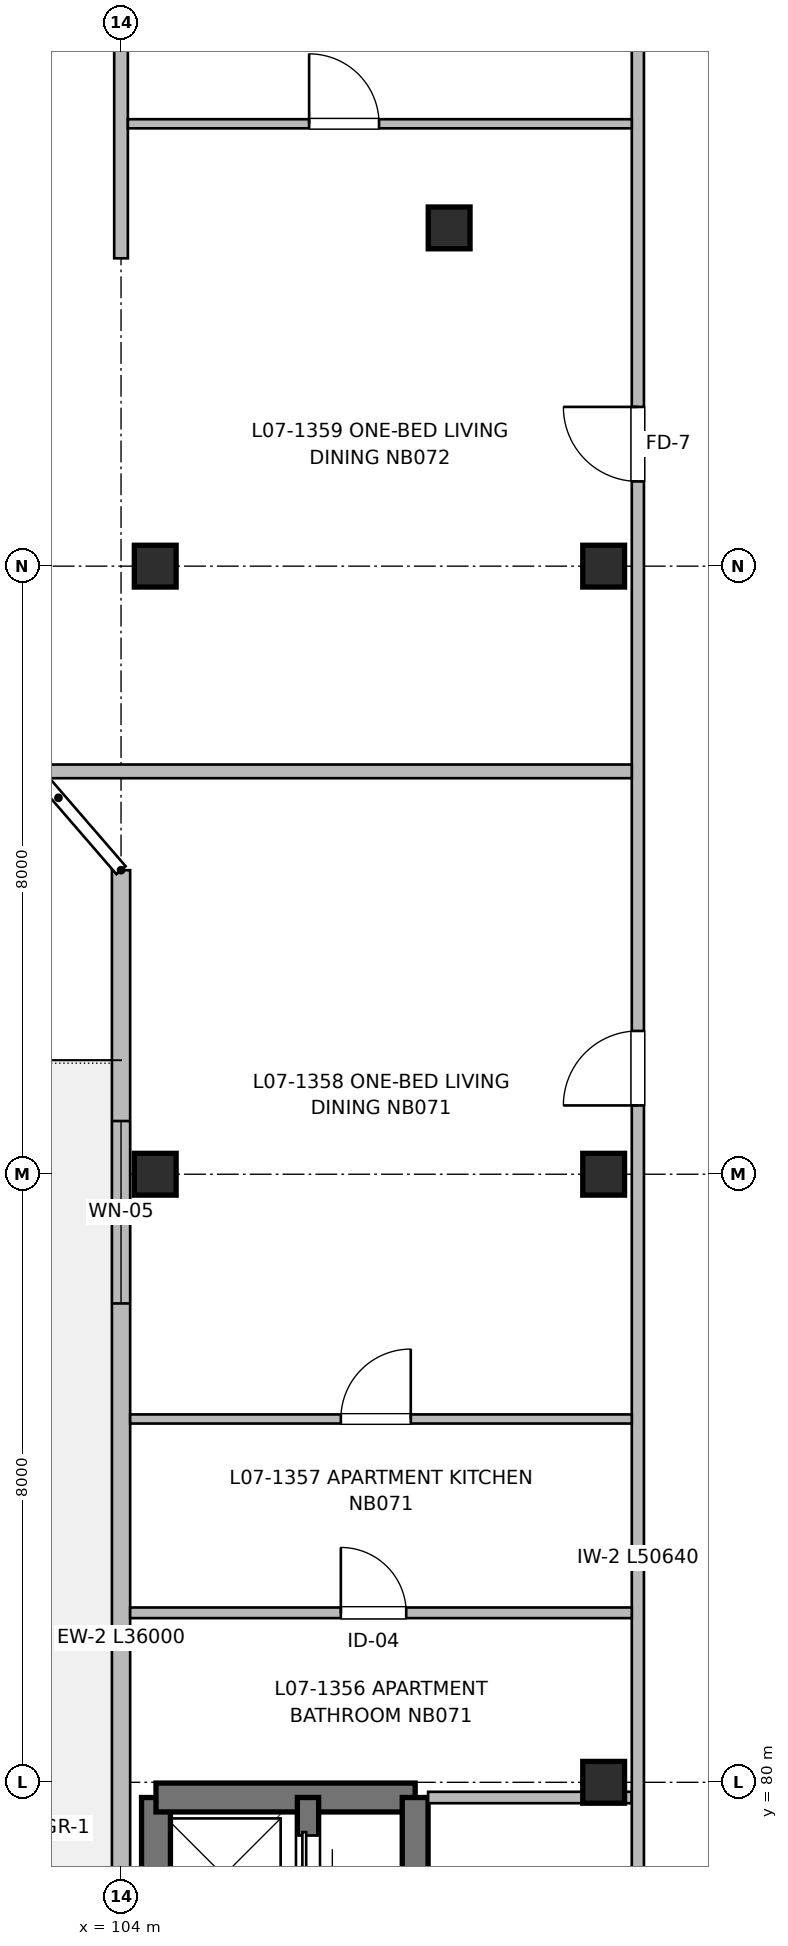
"""IFC4 building model, lengths in metres.
Left out: names, types, materials, properties, quantities, classifications, styles, units other than length and angle.
Written with IfcOpenShell. Run it as: python <this file> out.ifc"""

import sys

from ifc_helpers import new_model, si_unit, direction, frame, frame_2d, origin, origin_2d, place, context, subcontext, project, spatial, rectangle, extrude, element, fill, save


model = new_model("IFC4")
c1 = context("Model", 3, precision=1e-05, world=origin(), true_north=direction((0.0, 1.0)))
c2 = subcontext(c1, "Body", "Model", "MODEL_VIEW")
j1 = project(units=[si_unit("LENGTHUNIT", "METRE"), si_unit("PLANEANGLEUNIT", "RADIAN")], contexts=[c1])
p1 = place(None, origin())
s1 = spatial("IfcSite", under=j1, at=p1, CompositionType="ELEMENT")
p2 = place(p1, origin())
s2 = spatial("IfcBuilding", under=s1, at=p2, CompositionType="ELEMENT")
p3 = place(p2, frame((0.0, 0.0, 23.36)))
s3 = spatial("IfcBuildingStorey", under=s2, at=p3, CompositionType="ELEMENT", Elevation=23.36)
for number, where, z_axis, x_axis in (
    (1, (104.45, 88.0, 0.0), (0.0, 0.0, 1.0), (1.0, 0.0, 0.0)),
    (2, (104.45, 96.0, 0.0), (0.0, 0.0, 1.0), (1.0, 0.0, 0.0)),
    (3, (108.317, 100.45, 0.0), (0.0, 0.0, 1.0), (1.0, 0.0, 0.0)),
    (4, (110.35, 80.0, 0.0), (0.0, 0.0, 1.0), (1.0, 0.0, 0.0)),
    (5, (110.35, 88.0, 0.0), (0.0, 0.0, 1.0), (1.0, 0.0, 0.0)),
    (6, (110.35, 96.0, 0.0), (0.0, 0.0, 1.0), (1.0, 0.0, 0.0)),
):
    element("IfcColumn", number, at=place(p3, frame(where, z_axis=z_axis, x_axis=x_axis)), inside=s3, PredefinedType="COLUMN", context=c2, shape_type="SweptSolid", body=[
        extrude(rectangle(XDim=0.55, YDim=0.55, at=origin_2d()), origin(), (0.0, 0.0, 1.0), 3.2),
    ])
p4 = place(p3, frame((104.46, 67.35, 0.0), z_axis=(0.0, 0.0, 1.0), x_axis=(0.0, 1.0, 0.0)))
e7 = element("IfcWall", 7, at=p4, inside=s3, PredefinedType="SHEAR", context=c2, shape_type="SweptSolid", body=[
    extrude(rectangle(XDim=12.45, YDim=0.38, at=frame_2d((6.225, 0.0))), origin(), (0.0, 0.0, 1.0), 3.2),
])
p5 = place(p4, frame((2.2, 0.0, 0.97)))
e8 = element("IfcOpeningElement", 8, at=p5, cuts=e7, PredefinedType="OPENING", context=c2, shape_type="SweptSolid", body=[
    extrude(rectangle(XDim=0.95, YDim=1.25, at=frame_2d((0.475, 0.625))), frame((0.0, 0.2, 0.0), z_axis=(0.0, -1.0, 0.0), x_axis=(1.0, 0.0, 0.0)), (0.0, 0.0, 1.0), 0.4),
])
p6 = place(p3, frame((104.46, 79.8, 0.0), z_axis=(0.0, 0.0, 1.0), x_axis=(1.0, 0.0, 0.0)))
e9 = element("IfcWall", 9, at=p6, inside=s3, PredefinedType="SHEAR", context=c2, shape_type="SweptSolid", body=[
    extrude(rectangle(XDim=3.41, YDim=0.38, at=frame_2d((1.705, 0.0))), origin(), (0.0, 0.0, 1.0), 3.2),
])
p7 = place(p3, frame((107.87, 79.8, 0.0), z_axis=(0.0, 0.0, 1.0), x_axis=(0.0, -1.0, 0.0)))
e10 = element("IfcWall", 10, at=p7, inside=s3, PredefinedType="SHEAR", context=c2, shape_type="SweptSolid", body=[
    extrude(rectangle(XDim=12.45, YDim=0.34, at=frame_2d((6.225, 0.0))), origin(), (0.0, 0.0, 1.0), 3.2),
])
p8 = place(p7, frame((10.85, 0.0, 0.0)))
e11 = element("IfcOpeningElement", 11, at=p8, cuts=e10, PredefinedType="OPENING", context=c2, shape_type="SweptSolid", body=[
    extrude(rectangle(XDim=1.05, YDim=2.15, at=frame_2d((0.525, 1.075))), frame((0.0, 0.18, 0.0), z_axis=(0.0, -1.0, 0.0), x_axis=(1.0, 0.0, 0.0)), (0.0, 0.0, 1.0), 0.36),
])
p9 = place(p3, frame((106.46, 74.55, 0.0), z_axis=(0.0, 0.0, 1.0), x_axis=(0.0, 1.0, 0.0)))
e12 = element("IfcWall", 12, at=p9, inside=s3, PredefinedType="SHEAR", context=c2, shape_type="SweptSolid", body=[
    extrude(rectangle(XDim=5.25, YDim=0.28, at=frame_2d((2.625, 0.0))), origin(), (0.0, 0.0, 1.0), 3.2),
])
p10 = place(p9, frame((1.15, 0.0, 0.0)))
e13 = element("IfcOpeningElement", 13, at=p10, cuts=e12, PredefinedType="OPENING", context=c2, shape_type="SweptSolid", body=[
    extrude(rectangle(XDim=1.0, YDim=2.15, at=frame_2d((0.5, 1.075))), frame((0.0, 0.15, 0.0), z_axis=(0.0, -1.0, 0.0), x_axis=(1.0, 0.0, 0.0)), (0.0, 0.0, 1.0), 0.3),
])
p11 = place(p9, frame((3.85, 0.0, 0.0)))
e14 = element("IfcOpeningElement", 14, at=p11, cuts=e12, PredefinedType="OPENING", context=c2, shape_type="SweptSolid", body=[
    extrude(rectangle(XDim=0.9, YDim=2.15, at=frame_2d((0.45, 1.075))), frame((0.0, 0.15, 0.0), z_axis=(0.0, -1.0, 0.0), x_axis=(1.0, 0.0, 0.0)), (0.0, 0.0, 1.0), 0.3),
])
p12 = place(p3, frame((104.0, 56.0, 0.0), z_axis=(0.0, 0.0, 1.0), x_axis=(0.0, 1.0, 0.0)))
e15 = element("IfcWall", 15, at=p12, inside=s3, PredefinedType="SOLIDWALL", context=c2, shape_type="SweptSolid", body=[
    extrude(rectangle(XDim=36.0, YDim=0.24, at=frame_2d((18.0, 0.0))), origin(), (0.0, 0.0, 1.0), 2.98),
])
p13 = place(p12, frame((3.9, 0.0, 0.0)))
e16 = element("IfcOpeningElement", 16, at=p13, cuts=e15, PredefinedType="OPENING", context=c2, shape_type="SweptSolid", body=[
    extrude(rectangle(XDim=1.2, YDim=2.2, at=frame_2d((0.6, 1.1))), frame((0.0, 0.13, 0.0), z_axis=(0.0, -1.0, 0.0), x_axis=(1.0, 0.0, 0.0)), (0.0, 0.0, 1.0), 0.26),
])
p14 = place(p12, frame((5.8, 0.0, 0.9)))
e17 = element("IfcOpeningElement", 17, at=p14, cuts=e15, PredefinedType="OPENING", context=c2, shape_type="SweptSolid", body=[
    extrude(rectangle(XDim=1.05, YDim=1.15, at=frame_2d((0.525, 0.575))), frame((0.0, 0.13, 0.0), z_axis=(0.0, -1.0, 0.0), x_axis=(1.0, 0.0, 0.0)), (0.0, 0.0, 1.0), 0.26),
])
p15 = place(p12, frame((12.675, 0.0, 0.77)))
e18 = element("IfcOpeningElement", 18, at=p15, cuts=e15, PredefinedType="OPENING", context=c2, shape_type="SweptSolid", body=[
    extrude(rectangle(XDim=1.65, YDim=1.45, at=frame_2d((0.825, 0.725))), frame((0.0, 0.13, 0.0), z_axis=(0.0, -1.0, 0.0), x_axis=(1.0, 0.0, 0.0)), (0.0, 0.0, 1.0), 0.26),
])
p16 = place(p12, frame((19.9, 0.0, 0.77)))
e19 = element("IfcOpeningElement", 19, at=p16, cuts=e15, PredefinedType="OPENING", context=c2, shape_type="SweptSolid", body=[
    extrude(rectangle(XDim=1.6, YDim=1.45, at=frame_2d((0.8, 0.725))), frame((0.0, 0.13, 0.0), z_axis=(0.0, -1.0, 0.0), x_axis=(1.0, 0.0, 0.0)), (0.0, 0.0, 1.0), 0.26),
])
p17 = place(p12, frame((30.3, 0.0, 0.72)))
e20 = element("IfcOpeningElement", 20, at=p17, cuts=e15, PredefinedType="OPENING", context=c2, shape_type="SweptSolid", body=[
    extrude(rectangle(XDim=2.4, YDim=1.5, at=frame_2d((1.2, 0.75))), frame((0.0, 0.13, 0.0), z_axis=(0.0, -1.0, 0.0), x_axis=(1.0, 0.0, 0.0)), (0.0, 0.0, 1.0), 0.26),
])
p18 = place(p3, frame((108.04, 79.8, 0.0), z_axis=(0.0, 0.0, 1.0), x_axis=(1.0, 0.0, 0.0)))
e21 = element("IfcWall", 21, at=p18, inside=s3, PredefinedType="PARTITIONING", context=c2, shape_type="SweptSolid", body=[
    extrude(rectangle(XDim=2.68, YDim=0.15, at=frame_2d((1.34, 0.0))), origin(), (0.0, 0.0, 1.0), 2.935),
])
p19 = place(p3, frame((110.8, 56.16, 0.0), z_axis=(0.0, 0.0, 1.0), x_axis=(0.0, 1.0, 0.0)))
e22 = element("IfcWall", 22, at=p19, inside=s3, PredefinedType="PARTITIONING", context=c2, shape_type="SweptSolid", body=[
    extrude(rectangle(XDim=50.64, YDim=0.16, at=frame_2d((25.32, 0.0))), origin(), (0.0, 0.0, 1.0), 2.935),
])
p20 = place(p19, frame((12.84, 0.0, 0.0)))
e23 = element("IfcOpeningElement", 23, at=p20, cuts=e22, PredefinedType="OPENING", context=c2, shape_type="SweptSolid", body=[
    extrude(rectangle(XDim=1.1, YDim=2.15, at=frame_2d((0.55, 1.075))), frame((0.0, 0.09, 0.0), z_axis=(0.0, -1.0, 0.0), x_axis=(1.0, 0.0, 0.0)), (0.0, 0.0, 1.0), 0.18),
])
p21 = place(p19, frame((19.24, 0.0, 0.0)))
e24 = element("IfcOpeningElement", 24, at=p21, cuts=e22, PredefinedType="OPENING", context=c2, shape_type="SweptSolid", body=[
    extrude(rectangle(XDim=1.6, YDim=2.15, at=frame_2d((0.8, 1.075))), frame((0.0, 0.09, 0.0), z_axis=(0.0, -1.0, 0.0), x_axis=(1.0, 0.0, 0.0)), (0.0, 0.0, 1.0), 0.18),
])
p22 = place(p19, frame((1.8, 0.0, 0.0)))
e25 = element("IfcOpeningElement", 25, at=p22, cuts=e22, PredefinedType="OPENING", context=c2, shape_type="SweptSolid", body=[
    extrude(rectangle(XDim=0.96, YDim=2.15, at=frame_2d((0.48, 1.075))), frame((0.0, 0.09, 0.0), z_axis=(0.0, -1.0, 0.0), x_axis=(1.0, 0.0, 0.0)), (0.0, 0.0, 1.0), 0.18),
])
p23 = place(p19, frame((32.745, 0.0, 0.0)))
e26 = element("IfcOpeningElement", 26, at=p23, cuts=e22, PredefinedType="OPENING", context=c2, shape_type="SweptSolid", body=[
    extrude(rectangle(XDim=0.98, YDim=2.15, at=frame_2d((0.49, 1.075))), frame((0.0, 0.09, 0.0), z_axis=(0.0, -1.0, 0.0), x_axis=(1.0, 0.0, 0.0)), (0.0, 0.0, 1.0), 0.18),
])
p24 = place(p19, frame((40.955, 0.0, 0.0)))
e27 = element("IfcOpeningElement", 27, at=p24, cuts=e22, PredefinedType="OPENING", context=c2, shape_type="SweptSolid", body=[
    extrude(rectangle(XDim=0.98, YDim=2.15, at=frame_2d((0.49, 1.075))), frame((0.0, 0.09, 0.0), z_axis=(0.0, -1.0, 0.0), x_axis=(1.0, 0.0, 0.0)), (0.0, 0.0, 1.0), 0.18),
])
p25 = place(p3, frame((104.0, 100.05, 0.0), z_axis=(0.0, 0.0, 1.0), x_axis=(0.0, 1.0, 0.0)))
e28 = element("IfcWall", 28, at=p25, inside=s3, PredefinedType="PARTITIONING", context=c2, shape_type="SweptSolid", body=[
    extrude(rectangle(XDim=6.67, YDim=0.18, at=frame_2d((3.335, 0.0))), origin(), (0.0, 0.0, 1.0), 2.935),
])
p26 = place(p3, frame((102.929, 93.3, 0.0), z_axis=(0.0, 0.0, 1.0), x_axis=(1.0, 0.0, 0.0)))
e29 = element("IfcWall", 29, at=p26, inside=s3, PredefinedType="PARTITIONING", context=c2, shape_type="SweptSolid", body=[
    extrude(rectangle(XDim=7.791, YDim=0.18, at=frame_2d((3.895, 0.0))), origin(), (0.0, 0.0, 1.0), 2.935),
])
p27 = place(p3, frame((104.12, 82.23, 0.0), z_axis=(0.0, 0.0, 1.0), x_axis=(1.0, 0.0, 0.0)))
e30 = element("IfcWall", 30, at=p27, inside=s3, PredefinedType="PARTITIONING", context=c2, shape_type="SweptSolid", body=[
    extrude(rectangle(XDim=6.6, YDim=0.14, at=frame_2d((3.3, 0.0))), origin(), (0.0, 0.0, 1.0), 2.935),
])
p28 = place(p27, frame((2.772, 0.0, 0.0)))
e31 = element("IfcOpeningElement", 31, at=p28, cuts=e30, PredefinedType="OPENING", context=c2, shape_type="SweptSolid", body=[
    extrude(rectangle(XDim=0.86, YDim=2.1, at=frame_2d((0.43, 1.05))), frame((0.0, 0.08, 0.0), z_axis=(0.0, -1.0, 0.0), x_axis=(1.0, 0.0, 0.0)), (0.0, 0.0, 1.0), 0.16),
])
p29 = place(p3, frame((104.12, 84.78, 0.0), z_axis=(0.0, 0.0, 1.0), x_axis=(1.0, 0.0, 0.0)))
e32 = element("IfcWall", 32, at=p29, inside=s3, PredefinedType="PARTITIONING", context=c2, shape_type="SweptSolid", body=[
    extrude(rectangle(XDim=6.6, YDim=0.12, at=frame_2d((3.3, 0.0))), origin(), (0.0, 0.0, 1.0), 2.935),
])
p30 = place(p29, frame((2.772, 0.0, 0.0)))
e33 = element("IfcOpeningElement", 33, at=p30, cuts=e32, PredefinedType="OPENING", context=c2, shape_type="SweptSolid", body=[
    extrude(rectangle(XDim=0.92, YDim=2.1, at=frame_2d((0.46, 1.05))), frame((0.0, 0.07, 0.0), z_axis=(0.0, -1.0, 0.0), x_axis=(1.0, 0.0, 0.0)), (0.0, 0.0, 1.0), 0.14),
])
p31 = place(p3, frame((104.09, 101.82, 0.0), z_axis=(0.0, 0.0, 1.0), x_axis=(1.0, 0.0, 0.0)))
e34 = element("IfcWall", 34, at=p31, inside=s3, PredefinedType="PARTITIONING", context=c2, shape_type="SweptSolid", body=[
    extrude(rectangle(XDim=6.63, YDim=0.12, at=frame_2d((3.315, 0.0))), origin(), (0.0, 0.0, 1.0), 2.935),
])
p32 = place(p31, frame((2.385, 0.0, 0.0)))
e35 = element("IfcOpeningElement", 35, at=p32, cuts=e34, PredefinedType="OPENING", context=c2, shape_type="SweptSolid", body=[
    extrude(rectangle(XDim=0.92, YDim=2.1, at=frame_2d((0.46, 1.05))), frame((0.0, 0.07, 0.0), z_axis=(0.0, -1.0, 0.0), x_axis=(1.0, 0.0, 0.0)), (0.0, 0.0, 1.0), 0.14),
])
p33 = place(p11, origin())
e36 = element("IfcDoor", 36, at=p33, inside=s3, OperationType="SLIDING_TO_RIGHT", PredefinedType="DOOR", context=c2, shape_type="SweptSolid", body=[
    extrude(rectangle(XDim=0.9, YDim=2.15, at=frame_2d((0.45, 1.075))), frame((0.0, 0.025, 0.0), z_axis=(0.0, -1.0, 0.0), x_axis=(1.0, 0.0, 0.0)), (0.0, 0.0, 1.0), 0.05),
])
fill(e14, e36)
p34 = place(p17, origin())
e37 = element("IfcWindow", 37, at=p34, inside=s3, PartitioningType="SINGLE_PANEL", PredefinedType="WINDOW", context=c2, shape_type="SweptSolid", body=[
    extrude(rectangle(XDim=2.4, YDim=1.5, at=frame_2d((1.2, 0.75))), frame((0.0, 0.03, 0.0), z_axis=(0.0, -1.0, 0.0), x_axis=(1.0, 0.0, 0.0)), (0.0, 0.0, 1.0), 0.06),
])
fill(e20, e37)
p35 = place(p28, origin())
e38 = element("IfcDoor", 38, at=p35, inside=s3, OperationType="SINGLE_SWING_LEFT", PredefinedType="DOOR", context=c2, shape_type="SweptSolid", body=[
    extrude(rectangle(XDim=0.86, YDim=2.1, at=frame_2d((0.43, 1.05))), frame((0.0, 0.025, 0.0), z_axis=(0.0, -1.0, 0.0), x_axis=(1.0, 0.0, 0.0)), (0.0, 0.0, 1.0), 0.05),
])
fill(e31, e38)
p36 = place(p30, origin())
e39 = element("IfcDoor", 39, at=p36, inside=s3, OperationType="SINGLE_SWING_RIGHT", PredefinedType="DOOR", context=c2, shape_type="SweptSolid", body=[
    extrude(rectangle(XDim=0.92, YDim=2.1, at=frame_2d((0.46, 1.05))), frame((0.0, 0.025, 0.0), z_axis=(0.0, -1.0, 0.0), x_axis=(1.0, 0.0, 0.0)), (0.0, 0.0, 1.0), 0.05),
])
fill(e33, e39)
p37 = place(p23, origin())
e40 = element("IfcDoor", 40, at=p37, inside=s3, OperationType="SINGLE_SWING_LEFT", PredefinedType="DOOR", context=c2, shape_type="SweptSolid", body=[
    extrude(rectangle(XDim=0.98, YDim=2.15, at=frame_2d((0.49, 1.075))), frame((0.0, 0.025, 0.0), z_axis=(0.0, -1.0, 0.0), x_axis=(1.0, 0.0, 0.0)), (0.0, 0.0, 1.0), 0.05),
])
fill(e26, e40)
p38 = place(p32, origin())
e41 = element("IfcDoor", 41, at=p38, inside=s3, OperationType="SINGLE_SWING_LEFT", PredefinedType="DOOR", context=c2, shape_type="SweptSolid", body=[
    extrude(rectangle(XDim=0.92, YDim=2.1, at=frame_2d((0.46, 1.05))), frame((0.0, 0.025, 0.0), z_axis=(0.0, -1.0, 0.0), x_axis=(1.0, 0.0, 0.0)), (0.0, 0.0, 1.0), 0.05),
])
fill(e35, e41)
p39 = place(p24, origin())
e42 = element("IfcDoor", 42, at=p39, inside=s3, OperationType="SINGLE_SWING_RIGHT", PredefinedType="DOOR", context=c2, shape_type="SweptSolid", body=[
    extrude(rectangle(XDim=0.98, YDim=2.15, at=frame_2d((0.49, 1.075))), frame((0.0, 0.025, 0.0), z_axis=(0.0, -1.0, 0.0), x_axis=(1.0, 0.0, 0.0)), (0.0, 0.0, 1.0), 0.05),
])
fill(e27, e42)
save(model, sys.argv[1])
